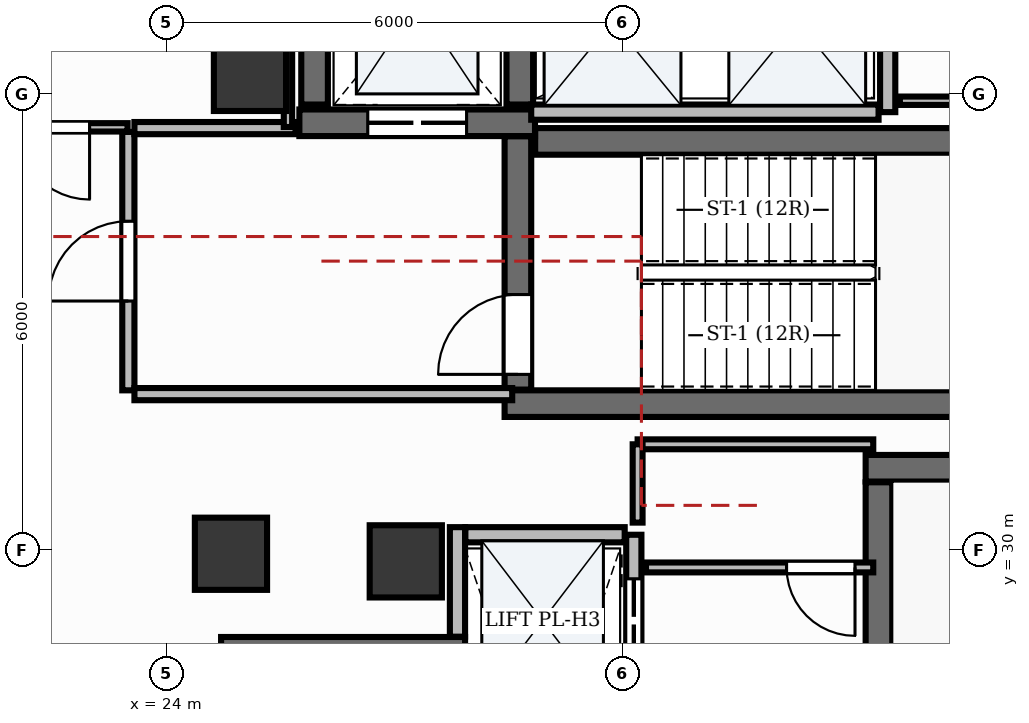
"""IFC4 building model, lengths in metres.
Left out: names, types, materials, properties, quantities, classifications, styles, units other than length and angle.
Written with IfcOpenShell. Run it as: python <this file> out.ifc"""

import sys

from ifc_helpers import new_model, si_unit, direction, frame, frame_2d, origin, origin_2d, place, context, subcontext, project, spatial, rectangle, extrude, element, fill, save


model = new_model("IFC4")
c1 = context("Model", 3, precision=1e-05, world=origin(), true_north=direction((0.0, 1.0)))
c2 = subcontext(c1, "Body", "Model", "MODEL_VIEW")
j1 = project(units=[si_unit("LENGTHUNIT", "METRE"), si_unit("PLANEANGLEUNIT", "RADIAN")], contexts=[c1])
p1 = place(None, origin())
s1 = spatial("IfcSite", under=j1, at=p1, CompositionType="ELEMENT")
p2 = place(p1, origin())
s2 = spatial("IfcBuilding", under=s1, at=p2, CompositionType="ELEMENT")
p3 = place(p2, frame((0.0, 0.0, 322.8)))
s3 = spatial("IfcBuildingStorey", under=s2, at=p3, CompositionType="ELEMENT", Elevation=322.8)
p4 = place(p3, frame((28.852, 35.375, 0.0), z_axis=(0.0, 0.0, 1.0), x_axis=(1.0, 0.0, 0.0)))
e1 = element("IfcWall", 1, at=p4, inside=s3, PredefinedType="SHEAR", context=c2, shape_type="SweptSolid", body=[
    extrude(rectangle(XDim=8.148, YDim=0.35, at=frame_2d((4.074, 0.0))), origin(), (0.0, 0.0, 1.0), 3.9),
])
p5 = place(p3, frame((28.45, 31.925, 0.0), z_axis=(0.0, 0.0, 1.0), x_axis=(1.0, 0.0, 0.0)))
e2 = element("IfcWall", 2, at=p5, inside=s3, PredefinedType="SHEAR", context=c2, shape_type="SweptSolid", body=[
    extrude(rectangle(XDim=8.55, YDim=0.35, at=frame_2d((4.275, 0.0))), origin(), (0.0, 0.0, 1.0), 3.9),
])
p6 = place(p3, frame((28.625, 32.11, 0.0), z_axis=(0.0, 0.0, 1.0), x_axis=(0.0, 1.0, 0.0)))
e3 = element("IfcWall", 3, at=p6, inside=s3, PredefinedType="SHEAR", context=c2, shape_type="SweptSolid", body=[
    extrude(rectangle(XDim=3.333, YDim=0.35, at=frame_2d((1.667, 0.0))), origin(), (0.0, 0.0, 1.0), 3.9),
])
p7 = place(p6, frame((0.2, 0.0, 0.0)))
e4 = element("IfcOpeningElement", 4, at=p7, cuts=e3, PredefinedType="OPENING", context=c2, shape_type="SweptSolid", body=[
    extrude(rectangle(XDim=1.05, YDim=2.15, at=frame_2d((0.525, 1.075))), frame((0.0, 0.19, 0.0), z_axis=(0.0, -1.0, 0.0), x_axis=(1.0, 0.0, 0.0)), (0.0, 0.0, 1.0), 0.38),
])
p8 = place(p3, frame((33.2, 31.075, 0.0), z_axis=(0.0, 0.0, 1.0), x_axis=(1.0, 0.0, 0.0)))
e5 = element("IfcWall", 5, at=p8, inside=s3, PredefinedType="SHEAR", context=c2, shape_type="SweptSolid", body=[
    extrude(rectangle(XDim=3.8, YDim=0.35, at=frame_2d((1.9, 0.0))), origin(), (0.0, 0.0, 1.0), 3.9),
])
p9 = place(p3, frame((33.375, 23.11, 0.0), z_axis=(0.0, 0.0, 1.0), x_axis=(0.0, 1.0, 0.0)))
e6 = element("IfcWall", 6, at=p9, inside=s3, PredefinedType="SHEAR", context=c2, shape_type="SweptSolid", body=[
    extrude(rectangle(XDim=7.78, YDim=0.35, at=frame_2d((3.89, 0.0))), origin(), (0.0, 0.0, 1.0), 3.9),
])
p10 = place(p9, frame((0.2, 0.0, 0.0)))
e7 = element("IfcOpeningElement", 7, at=p10, cuts=e6, PredefinedType="OPENING", context=c2, shape_type="SweptSolid", body=[
    extrude(rectangle(XDim=1.05, YDim=2.15, at=frame_2d((0.525, 1.075))), frame((0.0, 0.19, 0.0), z_axis=(0.0, -1.0, 0.0), x_axis=(1.0, 0.0, 0.0)), (0.0, 0.0, 1.0), 0.38),
])
p11 = place(p3, frame((25.75, 35.62, 0.0), z_axis=(0.0, 0.0, 1.0), x_axis=(1.0, 0.0, 0.0)))
e8 = element("IfcWall", 8, at=p11, inside=s3, PredefinedType="SHEAR", context=c2, shape_type="SweptSolid", body=[
    extrude(rectangle(XDim=3.1, YDim=0.35, at=frame_2d((1.55, 0.0))), origin(), (0.0, 0.0, 1.0), 3.9),
])
p12 = place(p11, frame((0.9, 0.0, 0.0)))
e9 = element("IfcOpeningElement", 9, at=p12, cuts=e8, PredefinedType="OPENING", context=c2, shape_type="SweptSolid", body=[
    extrude(rectangle(XDim=1.3, YDim=2.2, at=frame_2d((0.65, 1.1))), frame((0.0, 0.19, 0.0), z_axis=(0.0, -1.0, 0.0), x_axis=(1.0, 0.0, 0.0)), (0.0, 0.0, 1.0), 0.38),
])
for number, where, z_axis, x_axis in (
    (10, (25.95, 35.86, 0.0), (0.0, 0.0, 1.0), (0.0, 1.0, 0.0)),
    (11, (28.65, 35.86, 0.0), (0.0, 0.0, 1.0), (0.0, 1.0, 0.0)),
):
    element("IfcWall", number, at=place(p3, frame(where, z_axis=z_axis, x_axis=x_axis)), inside=s3, PredefinedType="SHEAR", context=c2, shape_type="SweptSolid", body=[
        extrude(rectangle(XDim=2.7, YDim=0.35, at=frame_2d((1.35, 0.0))), origin(), (0.0, 0.0, 1.0), 3.9),
    ])
p13 = place(p3, frame((24.72, 28.68, 0.0), z_axis=(0.0, 0.0, 1.0), x_axis=(1.0, 0.0, 0.0)))
e12 = element("IfcWall", 12, at=p13, inside=s3, PredefinedType="SHEAR", context=c2, shape_type="SweptSolid", body=[
    extrude(rectangle(XDim=3.21, YDim=0.35, at=frame_2d((1.605, 0.0))), origin(), (0.0, 0.0, 1.0), 3.9),
])
for number, where, z_axis, x_axis in (
    (13, (25.1, 36.25, -0.0), (0.0, 0.0, 1.0), (1.0, 0.0, 0.0)),
    (14, (24.85, 29.95, -0.0), (0.0, 0.0, 1.0), (1.0, 0.0, 0.0)),
    (15, (27.15, 29.85, -0.0), (0.0, 0.0, 1.0), (1.0, 0.0, 0.0)),
):
    element("IfcColumn", number, at=place(p3, frame(where, z_axis=z_axis, x_axis=x_axis)), inside=s3, PredefinedType="PILASTER", context=c2, shape_type="SweptSolid", body=[
        extrude(rectangle(XDim=0.95, YDim=0.95, at=origin_2d()), origin(), (0.0, 0.0, 1.0), 3.901),
    ])
p14 = place(p3, frame((27.83, 28.859, 0.0), z_axis=(0.0, 0.0, 1.0), x_axis=(0.0, 1.0, 0.0)))
e16 = element("IfcWall", 16, at=p14, inside=s3, PredefinedType="PARTITIONING", context=c2, shape_type="SweptSolid", body=[
    extrude(rectangle(XDim=1.441, YDim=0.2, at=frame_2d((0.721, 0.0))), origin(), (0.0, 0.0, 1.0), 2.22),
])
p15 = place(p3, frame((30.15, 23.85, 0.0), z_axis=(0.0, 0.0, 1.0), x_axis=(0.0, 1.0, 0.0)))
e17 = element("IfcWall", 17, at=p15, inside=s3, PredefinedType="PARTITIONING", context=c2, shape_type="SweptSolid", body=[
    extrude(rectangle(XDim=6.35, YDim=0.2, at=frame_2d((3.175, 0.0))), origin(), (0.0, 0.0, 1.0), 2.22),
])
p16 = place(p15, frame((0.58, 0.0, 0.0)))
e18 = element("IfcOpeningElement", 18, at=p16, cuts=e17, PredefinedType="OPENING", context=c2, shape_type="SweptSolid", body=[
    extrude(rectangle(XDim=1.1, YDim=2.2, at=frame_2d((0.55, 1.1))), frame((0.0, 0.115, 0.0), z_axis=(0.0, -1.0, 0.0), x_axis=(1.0, 0.0, 0.0)), (0.0, 0.0, 1.0), 0.23),
])
p17 = place(p15, frame((2.62, 0.0, 0.0)))
e19 = element("IfcOpeningElement", 19, at=p17, cuts=e17, PredefinedType="OPENING", context=c2, shape_type="SweptSolid", body=[
    extrude(rectangle(XDim=1.1, YDim=2.2, at=frame_2d((0.55, 1.1))), frame((0.0, 0.115, 0.0), z_axis=(0.0, -1.0, 0.0), x_axis=(1.0, 0.0, 0.0)), (0.0, 0.0, 1.0), 0.23),
])
p18 = place(p15, frame((4.67, 0.0, 0.0)))
e20 = element("IfcOpeningElement", 20, at=p18, cuts=e17, PredefinedType="OPENING", context=c2, shape_type="SweptSolid", body=[
    extrude(rectangle(XDim=1.1, YDim=2.2, at=frame_2d((0.55, 1.1))), frame((0.0, 0.115, 0.0), z_axis=(0.0, -1.0, 0.0), x_axis=(1.0, 0.0, 0.0)), (0.0, 0.0, 1.0), 0.23),
])
p19 = place(p3, frame((27.934, 30.2, 0.0), z_axis=(0.0, 0.0, 1.0), x_axis=(1.0, 0.0, 0.0)))
e21 = element("IfcWall", 21, at=p19, inside=s3, PredefinedType="PARTITIONING", context=c2, shape_type="SweptSolid", body=[
    extrude(rectangle(XDim=2.096, YDim=0.2, at=frame_2d((1.048, 0.0))), origin(), (0.0, 0.0, 1.0), 2.22),
])
p20 = place(p3, frame((33.49, 35.76, 0.0), z_axis=(0.0, 0.0, 1.0), x_axis=(0.0, 1.0, 0.0)))
e22 = element("IfcWall", 22, at=p20, inside=s3, PredefinedType="PARTITIONING", context=c2, shape_type="SweptSolid", body=[
    extrude(rectangle(XDim=2.38, YDim=0.2, at=frame_2d((1.19, 0.0))), origin(), (0.0, 0.0, 1.0), 2.22),
])
p21 = place(p3, frame((28.8, 35.76, 0.0), z_axis=(0.0, 0.0, 1.0), x_axis=(1.0, 0.0, 0.0)))
e23 = element("IfcWall", 23, at=p21, inside=s3, PredefinedType="PARTITIONING", context=c2, shape_type="SweptSolid", body=[
    extrude(rectangle(XDim=4.57, YDim=0.2, at=frame_2d((2.285, 0.0))), origin(), (0.0, 0.0, 1.0), 2.22),
])
p22 = place(p3, frame((23.5, 32.1, 0.0), z_axis=(0.0, 0.0, 1.0), x_axis=(0.0, 1.0, 0.0)))
e24 = element("IfcWall", 24, at=p22, inside=s3, PredefinedType="PARTITIONING", context=c2, shape_type="SweptSolid", body=[
    extrude(rectangle(XDim=3.4, YDim=0.16, at=frame_2d((1.7, 0.0))), origin(), (0.0, 0.0, 1.0), 2.22),
])
p23 = place(p22, frame((1.175, 0.0, 0.0)))
e25 = element("IfcOpeningElement", 25, at=p23, cuts=e24, PredefinedType="OPENING", context=c2, shape_type="SweptSolid", body=[
    extrude(rectangle(XDim=1.05, YDim=2.15, at=frame_2d((0.525, 1.075))), frame((0.0, 0.095, 0.0), z_axis=(0.0, -1.0, 0.0), x_axis=(1.0, 0.0, 0.0)), (0.0, 0.0, 1.0), 0.19),
])
p24 = place(p3, frame((23.58, 32.05, 0.0), z_axis=(0.0, 0.0, 1.0), x_axis=(1.0, 0.0, 0.0)))
e26 = element("IfcWall", 26, at=p24, inside=s3, PredefinedType="PARTITIONING", context=c2, shape_type="SweptSolid", body=[
    extrude(rectangle(XDim=4.97, YDim=0.16, at=frame_2d((2.485, 0.0))), origin(), (0.0, 0.0, 1.0), 2.22),
])
p25 = place(p3, frame((23.58, 35.55, 0.0), z_axis=(0.0, 0.0, 1.0), x_axis=(1.0, 0.0, 0.0)))
e27 = element("IfcWall", 27, at=p25, inside=s3, PredefinedType="PARTITIONING", context=c2, shape_type="SweptSolid", body=[
    extrude(rectangle(XDim=2.12, YDim=0.16, at=frame_2d((1.06, 0.0))), origin(), (0.0, 0.0, 1.0), 2.22),
])
p26 = place(p3, frame((33.3, 29.77, 0.0), z_axis=(0.0, 0.0, 1.0), x_axis=(-1.0, 0.0, 0.0)))
e28 = element("IfcWall", 28, at=p26, inside=s3, PredefinedType="PARTITIONING", context=c2, shape_type="SweptSolid", body=[
    extrude(rectangle(XDim=2.99, YDim=0.13, at=frame_2d((1.495, 0.0))), origin(), (0.0, 0.0, 1.0), 2.22),
])
p27 = place(p26, frame((0.24, 0.0, 0.0)))
e29 = element("IfcOpeningElement", 29, at=p27, cuts=e28, PredefinedType="OPENING", context=c2, shape_type="SweptSolid", body=[
    extrude(rectangle(XDim=0.9, YDim=2.15, at=frame_2d((0.45, 1.075))), frame((0.0, 0.08, 0.0), z_axis=(0.0, -1.0, 0.0), x_axis=(1.0, 0.0, 0.0)), (0.0, 0.0, 1.0), 0.16),
])
p28 = place(p3, frame((23.49, 35.56, 0.0), z_axis=(0.0, 0.0, 1.0), x_axis=(-1.0, 0.0, 0.0)))
e30 = element("IfcWall", 30, at=p28, inside=s3, PredefinedType="MOVABLE", context=c2, shape_type="SweptSolid", body=[
    extrude(rectangle(XDim=1.69, YDim=0.11, at=frame_2d((0.845, 0.0))), origin(), (0.0, 0.0, 1.0), 2.22),
])
p29 = place(p28, frame((0.5, 0.0, 0.0)))
e31 = element("IfcOpeningElement", 31, at=p29, cuts=e30, PredefinedType="OPENING", context=c2, shape_type="SweptSolid", body=[
    extrude(rectangle(XDim=0.95, YDim=2.15, at=frame_2d((0.475, 1.075))), frame((0.0, 0.07, 0.0), z_axis=(0.0, -1.0, 0.0), x_axis=(1.0, 0.0, 0.0)), (0.0, 0.0, 1.0), 0.14),
])
p30 = place(p3, frame((30.2, 31.39, 0.0), z_axis=(0.0, 0.0, 1.0), x_axis=(1.0, 0.0, 0.0)))
e32 = element("IfcWall", 32, at=p30, inside=s3, PredefinedType="PARTITIONING", context=c2, shape_type="SweptSolid", body=[
    extrude(rectangle(XDim=3.1, YDim=0.13, at=frame_2d((1.55, 0.0))), origin(), (0.0, 0.0, 1.0), 2.22),
])
p31 = place(p3, frame((30.2, 30.36, 0.0), z_axis=(0.0, 0.0, 1.0), x_axis=(0.0, 1.0, 0.0)))
e33 = element("IfcWall", 33, at=p31, inside=s3, PredefinedType="PARTITIONING", context=c2, shape_type="SweptSolid", body=[
    extrude(rectangle(XDim=1.03, YDim=0.13, at=frame_2d((0.515, 0.0))), origin(), (0.0, 0.0, 1.0), 2.22),
])
p32 = place(p3, frame((37.35, 35.91, 0.0), z_axis=(0.0, 0.0, 1.0), x_axis=(-1.0, 0.0, 0.0)))
e34 = element("IfcWall", 34, at=p32, inside=s3, PredefinedType="MOVABLE", context=c2, shape_type="SweptSolid", body=[
    extrude(rectangle(XDim=3.7, YDim=0.11, at=frame_2d((1.85, 0.0))), origin(), (0.0, 0.0, 1.0), 2.22),
])
p33 = place(p3, frame((25.6, 37.149, 0.0), z_axis=(0.0, 0.0, 1.0), x_axis=(0.0, -1.0, 0.0)))
e35 = element("IfcWall", 35, at=p33, inside=s3, PredefinedType="MOVABLE", context=c2, shape_type="SweptSolid", body=[
    extrude(rectangle(XDim=1.585, YDim=0.11, at=frame_2d((0.792, 0.0))), origin(), (0.0, 0.0, 1.0), 2.22),
])
p34 = place(p7, origin())
e36 = element("IfcDoor", 36, at=p34, inside=s3, OperationType="SINGLE_SWING_LEFT", PredefinedType="DOOR", context=c2, shape_type="SweptSolid", body=[
    extrude(rectangle(XDim=1.05, YDim=2.15, at=frame_2d((0.525, 1.075))), frame((0.0, 0.025, 0.0), z_axis=(0.0, -1.0, 0.0), x_axis=(1.0, 0.0, 0.0)), (0.0, 0.0, 1.0), 0.05),
])
fill(e4, e36)
p35 = place(p18, origin())
e37 = element("IfcDoor", 37, at=p35, inside=s3, OperationType="DOUBLE_DOOR_SLIDING", PredefinedType="DOOR", context=c2, shape_type="SweptSolid", body=[
    extrude(rectangle(XDim=1.1, YDim=2.2, at=frame_2d((0.55, 1.1))), frame((0.0, 0.025, 0.0), z_axis=(0.0, -1.0, 0.0), x_axis=(1.0, 0.0, 0.0)), (0.0, 0.0, 1.0), 0.05),
])
fill(e20, e37)
p36 = place(p12, origin())
e38 = element("IfcDoor", 38, at=p36, inside=s3, OperationType="DOUBLE_DOOR_SLIDING", PredefinedType="DOOR", context=c2, shape_type="SweptSolid", body=[
    extrude(rectangle(XDim=1.3, YDim=2.2, at=frame_2d((0.65, 1.1))), frame((0.0, 0.025, 0.0), z_axis=(0.0, -1.0, 0.0), x_axis=(1.0, 0.0, 0.0)), (0.0, 0.0, 1.0), 0.05),
])
fill(e9, e38)
p37 = place(p23, origin())
e39 = element("IfcDoor", 39, at=p37, inside=s3, OperationType="SINGLE_SWING_LEFT", PredefinedType="DOOR", context=c2, shape_type="SweptSolid", body=[
    extrude(rectangle(XDim=1.05, YDim=2.15, at=frame_2d((0.525, 1.075))), frame((0.0, 0.025, 0.0), z_axis=(0.0, -1.0, 0.0), x_axis=(1.0, 0.0, 0.0)), (0.0, 0.0, 1.0), 0.05),
])
fill(e25, e39)
p38 = place(p27, origin())
e40 = element("IfcDoor", 40, at=p38, inside=s3, OperationType="SINGLE_SWING_LEFT", PredefinedType="DOOR", context=c2, shape_type="SweptSolid", body=[
    extrude(rectangle(XDim=0.9, YDim=2.15, at=frame_2d((0.45, 1.075))), frame((0.0, 0.025, 0.0), z_axis=(0.0, -1.0, 0.0), x_axis=(1.0, 0.0, 0.0)), (0.0, 0.0, 1.0), 0.05),
])
fill(e29, e40)
p39 = place(p29, origin())
e41 = element("IfcDoor", 41, at=p39, inside=s3, OperationType="SINGLE_SWING_LEFT", PredefinedType="DOOR", context=c2, shape_type="SweptSolid", body=[
    extrude(rectangle(XDim=0.95, YDim=2.15, at=frame_2d((0.475, 1.075))), frame((0.0, 0.025, 0.0), z_axis=(0.0, -1.0, 0.0), x_axis=(1.0, 0.0, 0.0)), (0.0, 0.0, 1.0), 0.05),
])
fill(e31, e41)
save(model, sys.argv[1])
